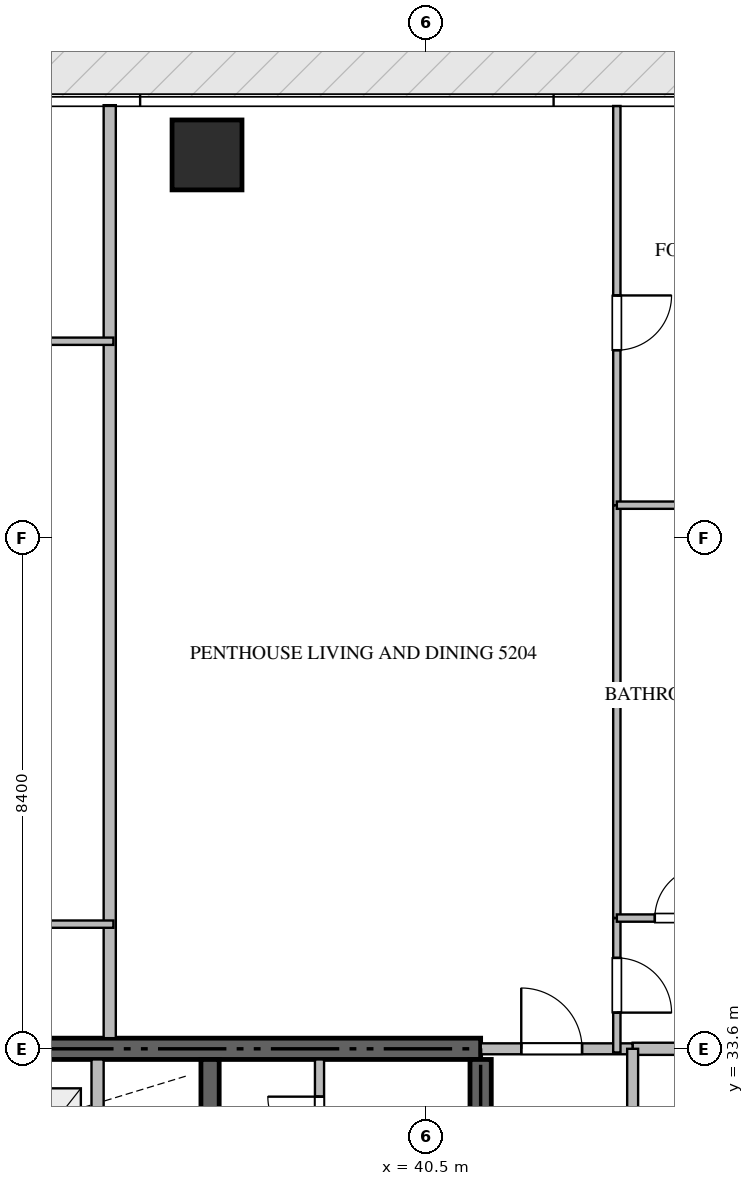
"""IFC4 building model, lengths in metres.
Left out: names, types, materials, properties, quantities, classifications, styles, units other than length and angle.
Written with IfcOpenShell. Run it as: python <this file> out.ifc"""

import sys

from ifc_helpers import new_model, si_unit, direction, frame, frame_2d, origin, origin_2d, place, context, subcontext, project, spatial, rectangle, extrude, source, transform, mapped, element, fill, save


model = new_model("IFC4")
c1 = context("Model", 3, precision=1e-05, world=origin(), true_north=direction((0.0, 1.0)))
c2 = subcontext(c1, "Body", "Model", "MODEL_VIEW")
j1 = project(units=[si_unit("LENGTHUNIT", "METRE"), si_unit("PLANEANGLEUNIT", "RADIAN")], contexts=[c1])
p1 = place(None, origin())
s1 = spatial("IfcSite", under=j1, at=p1, CompositionType="ELEMENT")
p2 = place(p1, origin())
s2 = spatial("IfcBuilding", under=s1, at=p2, CompositionType="ELEMENT")
p3 = place(p2, frame((0.0, 0.0, 210.45)))
s3 = spatial("IfcBuildingStorey", under=s2, at=p3, CompositionType="ELEMENT", Elevation=210.45)
p4 = place(p3, frame((41.4, 33.6, -0.44), z_axis=(0.0, 0.0, 1.0), x_axis=(-1.0, 0.0, 0.0)))
e1 = element("IfcWall", 1, at=p4, inside=s3, PredefinedType="SHEAR", context=c2, shape_type="SweptSolid", body=[
    extrude(rectangle(XDim=18.0, YDim=0.35, at=frame_2d((9.0, 0.0))), origin(), (0.0, 0.0, 1.0), 4.028),
])
p5 = place(p3, frame((41.4, 27.75, -0.44), z_axis=(0.0, 0.0, 1.0), x_axis=(0.0, 1.0, 0.0)))
e2 = element("IfcWall", 2, at=p5, inside=s3, PredefinedType="SHEAR", context=c2, shape_type="SweptSolid", body=[
    extrude(rectangle(XDim=5.675, YDim=0.35, at=frame_2d((2.837, 0.0))), origin(), (0.0, 0.0, 1.0), 4.028),
])
p6 = place(p3, frame((36.95, 27.05, -0.44), z_axis=(0.0, 0.0, 1.0), x_axis=(0.0, 1.0, 0.0)))
e3 = element("IfcWall", 3, at=p6, inside=s3, PredefinedType="SHEAR", context=c2, shape_type="SweptSolid", body=[
    extrude(rectangle(XDim=6.375, YDim=0.3, at=frame_2d((3.188, 0.0))), origin(), (0.0, 0.0, 1.0), 4.028),
])
m1 = source(origin(), c2, "Body", "SweptSolid", [
    extrude(rectangle(XDim=1.15, YDim=1.15, at=origin_2d()), origin(), (0.0, 0.0, 1.0), 4.03),
])
p7 = place(p3, frame((36.9, 48.3, -0.44), z_axis=(0.0, 0.0, 1.0), x_axis=(1.0, 0.0, 0.0)))
e4 = element("IfcColumn", 4, at=p7, inside=s3, PredefinedType="COLUMN", context=c2, shape_type="MappedRepresentation", body=[
    mapped(m1, transform((0.0, 0.0, 0.0), scale=1.0)),
])
p8 = place(p3, frame((35.1, 30.75, 0.0), z_axis=(0.0, 0.0, 1.0), x_axis=(0.0, 1.0, 0.0)))
e5 = element("IfcWall", 5, at=p8, inside=s3, PredefinedType="STANDARD", context=c2, shape_type="SweptSolid", body=[
    extrude(rectangle(XDim=2.675, YDim=0.2, at=frame_2d((1.337, 0.0))), origin(), (0.0, 0.0, 1.0), 3.59),
])
p9 = place(p3, frame((38.75, 31.352, 0.0), z_axis=(0.0, 0.0, 1.0), x_axis=(0.0, 1.0, 0.0)))
e6 = element("IfcWall", 6, at=p9, inside=s3, PredefinedType="PARTITIONING", context=c2, shape_type="SweptSolid", body=[
    extrude(rectangle(XDim=2.073, YDim=0.15, at=frame_2d((1.037, 0.0))), origin(), (0.0, 0.0, 1.0), 3.59),
])
p10 = place(p9, frame((0.611, 0.0, 0.0)))
e7 = element("IfcOpeningElement", 7, at=p10, cuts=e6, PredefinedType="OPENING", context=c2, shape_type="SweptSolid", body=[
    extrude(rectangle(XDim=0.85, YDim=2.1, at=frame_2d((0.425, 1.05))), frame((0.0, 0.085, 0.0), z_axis=(0.0, -1.0, 0.0), x_axis=(1.0, 0.0, 0.0)), (0.0, 0.0, 1.0), 0.17),
])
p11 = place(p3, frame((35.3, 33.775, 0.0), z_axis=(0.0, 0.0, 1.0), x_axis=(0.0, 1.0, 0.0)))
e8 = element("IfcWall", 8, at=p11, inside=s3, PredefinedType="PARTITIONING", context=c2, shape_type="SweptSolid", body=[
    extrude(rectangle(XDim=15.343, YDim=0.2, at=frame_2d((7.671, 0.0))), origin(), (0.0, 0.0, 1.0), 3.59),
])
p12 = place(p3, frame((43.9, 33.6, 0.0), z_axis=(0.0, 0.0, 1.0), x_axis=(1.0, 0.0, 0.0)))
e9 = element("IfcWall", 9, at=p12, inside=s3, PredefinedType="PARTITIONING", context=c2, shape_type="SweptSolid", body=[
    extrude(rectangle(XDim=13.418, YDim=0.2, at=frame_2d((6.709, 0.0))), origin(), (0.0, 0.0, 1.0), 3.59),
])
p13 = place(p3, frame((41.402, 33.6, 0.0), z_axis=(0.0, 0.0, 1.0), x_axis=(1.0, 0.0, 0.0)))
e10 = element("IfcWall", 10, at=p13, inside=s3, PredefinedType="PARTITIONING", context=c2, shape_type="SweptSolid", body=[
    extrude(rectangle(XDim=2.496, YDim=0.18, at=frame_2d((1.248, 0.0))), origin(), (0.0, 0.0, 1.0), 3.59),
])
p14 = place(p13, frame((0.666, 0.0, 0.0)))
e11 = element("IfcOpeningElement", 11, at=p14, cuts=e10, PredefinedType="OPENING", context=c2, shape_type="SweptSolid", body=[
    extrude(rectangle(XDim=1.0, YDim=2.15, at=frame_2d((0.5, 1.075))), frame((0.0, 0.1, 0.0), z_axis=(0.0, -1.0, 0.0), x_axis=(1.0, 0.0, 0.0)), (0.0, 0.0, 1.0), 0.2),
])
p15 = place(p3, frame((43.9, 16.8, 0.0), z_axis=(0.0, 0.0, 1.0), x_axis=(0.0, 1.0, 0.0)))
e12 = element("IfcWall", 12, at=p15, inside=s3, PredefinedType="PARTITIONING", context=c2, shape_type="SweptSolid", body=[
    extrude(rectangle(XDim=16.8, YDim=0.18, at=frame_2d((8.4, 0.0))), origin(), (0.0, 0.0, 1.0), 3.59),
])
p16 = place(p15, frame((1.3, 0.0, 0.0)))
e13 = element("IfcOpeningElement", 13, at=p16, cuts=e12, PredefinedType="OPENING", context=c2, shape_type="SweptSolid", body=[
    extrude(rectangle(XDim=1.0, YDim=2.15, at=frame_2d((0.5, 1.075))), frame((0.0, 0.1, 0.0), z_axis=(0.0, -1.0, 0.0), x_axis=(1.0, 0.0, 0.0)), (0.0, 0.0, 1.0), 0.2),
])
for number, where, z_axis, x_axis in (
    (14, (26.3, 45.236, 0.0), (0.0, 0.0, 1.0), (1.0, 0.0, 0.0)),
    (15, (26.3, 35.65, 0.0), (0.0, 0.0, 1.0), (1.0, 0.0, 0.0)),
):
    element("IfcWall", number, at=place(p3, frame(where, z_axis=z_axis, x_axis=x_axis)), inside=s3, PredefinedType="PARTITIONING", context=c2, shape_type="SweptSolid", body=[
        extrude(rectangle(XDim=9.06, YDim=0.12, at=frame_2d((4.53, 0.0))), origin(), (0.0, 0.0, 1.0), 3.59),
    ])
p17 = place(p3, frame((43.64, 35.75, 0.0), z_axis=(0.0, 0.0, 1.0), x_axis=(0.0, -1.0, 0.0)))
e16 = element("IfcWall", 16, at=p17, inside=s3, PredefinedType="PARTITIONING", context=c2, shape_type="SweptSolid", body=[
    extrude(rectangle(XDim=2.21, YDim=0.12, at=frame_2d((1.105, 0.0))), origin(), (0.0, 0.0, 1.0), 3.59),
])
p18 = place(p17, frame((0.655, 0.0, 0.0)))
e17 = element("IfcOpeningElement", 17, at=p18, cuts=e16, PredefinedType="OPENING", context=c2, shape_type="SweptSolid", body=[
    extrude(rectangle(XDim=0.9, YDim=2.1, at=frame_2d((0.45, 1.05))), frame((0.0, 0.07, 0.0), z_axis=(0.0, -1.0, 0.0), x_axis=(1.0, 0.0, 0.0)), (0.0, 0.0, 1.0), 0.14),
])
p19 = place(p3, frame((43.64, 49.105, 0.0), z_axis=(0.0, 0.0, 1.0), x_axis=(0.0, -1.0, 0.0)))
e18 = element("IfcWall", 18, at=p19, inside=s3, PredefinedType="PARTITIONING", context=c2, shape_type="SweptSolid", body=[
    extrude(rectangle(XDim=6.565, YDim=0.12, at=frame_2d((3.282, 0.0))), origin(), (0.0, 0.0, 1.0), 3.59),
])
p20 = place(p19, frame((3.116, 0.0, 0.0)))
e19 = element("IfcOpeningElement", 19, at=p20, cuts=e18, PredefinedType="OPENING", context=c2, shape_type="SweptSolid", body=[
    extrude(rectangle(XDim=0.9, YDim=2.1, at=frame_2d((0.45, 1.05))), frame((0.0, 0.07, 0.0), z_axis=(0.0, -1.0, 0.0), x_axis=(1.0, 0.0, 0.0)), (0.0, 0.0, 1.0), 0.14),
])
p21 = place(p3, frame((43.64, 42.538, 0.0), z_axis=(0.0, 0.0, 1.0), x_axis=(0.0, -1.0, 0.0)))
e20 = element("IfcWall", 20, at=p21, inside=s3, PredefinedType="PARTITIONING", context=c2, shape_type="SweptSolid", body=[
    extrude(rectangle(XDim=6.786, YDim=0.12, at=frame_2d((3.393, 0.0))), origin(), (0.0, 0.0, 1.0), 3.59),
])
p22 = place(p3, frame((43.64, 42.54, 0.0), z_axis=(0.0, 0.0, 1.0), x_axis=(1.0, 0.0, 0.0)))
e21 = element("IfcWall", 21, at=p22, inside=s3, PredefinedType="PARTITIONING", context=c2, shape_type="SweptSolid", body=[
    extrude(rectangle(XDim=5.15, YDim=0.12, at=frame_2d((2.575, 0.0))), origin(), (0.0, 0.0, 1.0), 3.59),
])
p23 = place(p3, frame((43.64, 35.75, 0.0), z_axis=(0.0, 0.0, 1.0), x_axis=(1.0, 0.0, 0.0)))
e22 = element("IfcWall", 22, at=p23, inside=s3, PredefinedType="PARTITIONING", context=c2, shape_type="SweptSolid", body=[
    extrude(rectangle(XDim=2.1, YDim=0.12, at=frame_2d((1.05, 0.0))), origin(), (0.0, 0.0, 1.0), 3.59),
])
p24 = place(p23, frame((0.625, 0.0, 0.0)))
e23 = element("IfcOpeningElement", 23, at=p24, cuts=e22, PredefinedType="OPENING", context=c2, shape_type="SweptSolid", body=[
    extrude(rectangle(XDim=0.85, YDim=2.1, at=frame_2d((0.425, 1.05))), frame((0.0, 0.07, 0.0), z_axis=(0.0, -1.0, 0.0), x_axis=(1.0, 0.0, 0.0)), (0.0, 0.0, 1.0), 0.14),
])
m2 = source(origin(), c2, "Body", "SweptSolid", [
    extrude(rectangle(XDim=0.85, YDim=2.1, at=frame_2d((0.425, 1.05))), frame((0.0, 0.025, 0.0), z_axis=(0.0, -1.0, 0.0), x_axis=(1.0, 0.0, 0.0)), (0.0, 0.0, 1.0), 0.05),
])
p25 = place(p10, origin())
e24 = element("IfcDoor", 24, at=p25, inside=s3, OperationType="SINGLE_SWING_RIGHT", PredefinedType="DOOR", context=c2, shape_type="MappedRepresentation", body=[
    mapped(m2, transform((0.0, 0.0, 0.0), scale=1.0)),
])
fill(e7, e24)
m3 = source(origin(), c2, "Body", "SweptSolid", [
    extrude(rectangle(XDim=1.0, YDim=2.15, at=frame_2d((0.5, 1.075))), frame((0.0, 0.025, 0.0), z_axis=(0.0, -1.0, 0.0), x_axis=(1.0, 0.0, 0.0)), (0.0, 0.0, 1.0), 0.05),
])
p26 = place(p14, origin())
e25 = element("IfcDoor", 25, at=p26, inside=s3, OperationType="SINGLE_SWING_LEFT", PredefinedType="DOOR", context=c2, shape_type="MappedRepresentation", body=[
    mapped(m3, transform((0.0, 0.0, 0.0), scale=1.0)),
])
fill(e11, e25)
m4 = source(origin(), c2, "Body", "SweptSolid", [
    extrude(rectangle(XDim=0.9, YDim=2.1, at=frame_2d((0.45, 1.05))), frame((0.0, 0.025, 0.0), z_axis=(0.0, -1.0, 0.0), x_axis=(1.0, 0.0, 0.0)), (0.0, 0.0, 1.0), 0.05),
])
p27 = place(p18, origin())
e26 = element("IfcDoor", 26, at=p27, inside=s3, OperationType="SINGLE_SWING_RIGHT", PredefinedType="DOOR", context=c2, shape_type="MappedRepresentation", body=[
    mapped(m4, transform((0.0, 0.0, 0.0), scale=1.0)),
])
fill(e17, e26)
p28 = place(p20, origin())
e27 = element("IfcDoor", 27, at=p28, inside=s3, OperationType="SINGLE_SWING_LEFT", PredefinedType="DOOR", context=c2, shape_type="MappedRepresentation", body=[
    mapped(m4, transform((0.0, 0.0, 0.0), scale=1.0)),
])
fill(e19, e27)
p29 = place(p24, origin())
e28 = element("IfcDoor", 28, at=p29, inside=s3, OperationType="SINGLE_SWING_RIGHT", PredefinedType="DOOR", context=c2, shape_type="MappedRepresentation", body=[
    mapped(m2, transform((0.0, 0.0, 0.0), scale=1.0)),
])
fill(e23, e28)
save(model, sys.argv[1])
